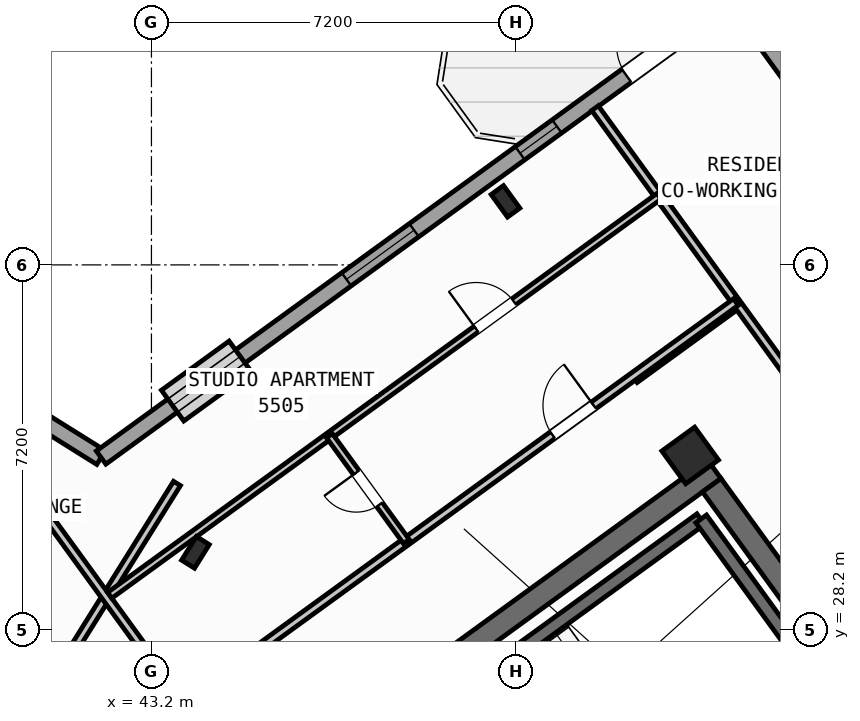
"""IFC4 building model, lengths in metres.
Left out: names, types, materials, properties, quantities, classifications, styles, units other than length and angle.
Written with IfcOpenShell. Run it as: python <this file> out.ifc"""

import sys

from ifc_helpers import new_model, si_unit, direction, frame, frame_2d, origin, origin_2d, place, context, subcontext, project, spatial, rectangle, hollow_rectangle, i_section, extrude, source, transform, mapped, element, fill, save


model = new_model("IFC4")
c1 = context("Model", 3, precision=1e-05, world=origin(), true_north=direction((0.0, 1.0)))
c2 = subcontext(c1, "Body", "Model", "MODEL_VIEW")
j1 = project(units=[si_unit("LENGTHUNIT", "METRE"), si_unit("PLANEANGLEUNIT", "RADIAN")], contexts=[c1])
p1 = place(None, origin())
s1 = spatial("IfcSite", under=j1, at=p1, CompositionType="ELEMENT")
p2 = place(p1, origin())
s2 = spatial("IfcBuilding", under=s1, at=p2, CompositionType="ELEMENT")
p3 = place(p2, frame((0.0, 0.0, 218.4)))
s3 = spatial("IfcBuildingStorey", under=s2, at=p3, CompositionType="ELEMENT", Elevation=218.4)
p4 = place(p3, frame((44.406, 24.172, 0.0), z_axis=(0.0, 0.0, 1.0), x_axis=(0.809012867805, 0.587790931986, 0.0)))
e1 = element("IfcWall", 1, at=p4, inside=s3, PredefinedType="SHEAR", context=c2, shape_type="SweptSolid", body=[
    extrude(rectangle(XDim=12.24, YDim=0.45, at=frame_2d((6.12, 0.0))), origin(), (0.0, 0.0, 1.0), 3.35),
])
p5 = place(p3, frame((58.064, 25.813, 0.0), z_axis=(0.0, 0.0, 1.0), x_axis=(-0.587774812919, 0.809024578921, 0.0)))
e2 = element("IfcWall", 2, at=p5, inside=s3, PredefinedType="SHEAR", context=c2, shape_type="SweptSolid", body=[
    extrude(rectangle(XDim=6.475, YDim=0.45, at=frame_2d((3.238, 0.0))), origin(), (0.0, 0.0, 1.0), 3.35),
])
m1 = source(origin(), c2, "Body", "SweptSolid", [
    extrude(i_section(OverallWidth=0.3, OverallDepth=0.55, WebThickness=0.015, FlangeThickness=0.029, at=origin_2d()), origin(), (0.0, 0.0, 1.0), 3.6),
])
p6 = place(p3, frame((44.068, 29.726, 0.0), z_axis=(0.0, 0.0, 1.0), x_axis=(-0.848048096156, 0.529919264233, 0.0)))
e3 = element("IfcColumn", 3, at=p6, inside=s3, PredefinedType="COLUMN", context=c2, shape_type="MappedRepresentation", body=[
    mapped(m1, transform((0.0, 0.0, 0.0), scale=1.0)),
])
m2 = source(origin(), c2, "Body", "SweptSolid", [
    extrude(hollow_rectangle(XDim=0.8, YDim=0.8, WallThickness=0.032, at=origin_2d()), origin(), (0.0, 0.0, 1.0), 3.6),
])
p7 = place(p3, frame((53.832, 31.638, 0.0), z_axis=(0.0, 0.0, 1.0), x_axis=(0.809016994375, 0.587785252292, 0.0)))
e4 = element("IfcColumn", 4, at=p7, inside=s3, PredefinedType="COLUMN", context=c2, shape_type="MappedRepresentation", body=[
    mapped(m2, transform((0.0, 0.0, 0.0), scale=1.0)),
])
p8 = place(p3, frame((50.188, 36.654, 0.0), z_axis=(0.0, 0.0, 1.0), x_axis=(0.809016994375, 0.587785252292, 0.0)))
e5 = element("IfcColumn", 5, at=p8, inside=s3, PredefinedType="COLUMN", context=c2, shape_type="MappedRepresentation", body=[
    mapped(m1, transform((0.0, 0.0, 0.0), scale=1.0)),
])
p9 = place(p3, frame((17.424, 47.083, 0.0), z_axis=(0.0, 0.0, 1.0), x_axis=(0.848049927979, -0.529916332693, 0.0)))
e6 = element("IfcWall", 6, at=p9, inside=s3, PredefinedType="STANDARD", context=c2, shape_type="SweptSolid", body=[
    extrude(rectangle(XDim=29.223, YDim=0.32, at=frame_2d((14.612, 0.0))), origin(), (0.0, 0.0, 1.0), 3.35),
])
p10 = place(p9, frame((3.77, 0.0, 0.0)))
e7 = element("IfcOpeningElement", 7, at=p10, cuts=e6, PredefinedType="OPENING", context=c2, shape_type="SweptSolid", body=[
    extrude(rectangle(XDim=1.05, YDim=2.15, at=frame_2d((0.525, 1.075))), frame((0.0, 0.17, 0.0), z_axis=(0.0, -1.0, 0.0), x_axis=(1.0, 0.0, 0.0)), (0.0, 0.0, 1.0), 0.34),
])
p11 = place(p9, frame((1.125, 0.0, 0.9)))
e8 = element("IfcOpeningElement", 8, at=p11, cuts=e6, PredefinedType="OPENING", context=c2, shape_type="SweptSolid", body=[
    extrude(rectangle(XDim=1.65, YDim=1.45, at=frame_2d((0.825, 0.725))), frame((0.0, 0.17, 0.0), z_axis=(0.0, -1.0, 0.0), x_axis=(1.0, 0.0, 0.0)), (0.0, 0.0, 1.0), 0.34),
])
p12 = place(p9, frame((7.384, 0.0, 0.9)))
e9 = element("IfcOpeningElement", 9, at=p12, cuts=e6, PredefinedType="OPENING", context=c2, shape_type="SweptSolid", body=[
    extrude(rectangle(XDim=1.35, YDim=1.45, at=frame_2d((0.675, 0.725))), frame((0.0, 0.17, 0.0), z_axis=(0.0, -1.0, 0.0), x_axis=(1.0, 0.0, 0.0)), (0.0, 0.0, 1.0), 0.34),
])
p13 = place(p9, frame((10.054, 0.0, 0.9)))
e10 = element("IfcOpeningElement", 10, at=p13, cuts=e6, PredefinedType="OPENING", context=c2, shape_type="SweptSolid", body=[
    extrude(rectangle(XDim=1.35, YDim=1.45, at=frame_2d((0.675, 0.725))), frame((0.0, 0.17, 0.0), z_axis=(0.0, -1.0, 0.0), x_axis=(1.0, 0.0, 0.0)), (0.0, 0.0, 1.0), 0.34),
])
p14 = place(p9, frame((14.039, 0.0, 1.0)))
e11 = element("IfcOpeningElement", 11, at=p14, cuts=e6, PredefinedType="OPENING", context=c2, shape_type="SweptSolid", body=[
    extrude(rectangle(XDim=0.9, YDim=1.25, at=frame_2d((0.45, 0.625))), frame((0.0, 0.17, 0.0), z_axis=(0.0, -1.0, 0.0), x_axis=(1.0, 0.0, 0.0)), (0.0, 0.0, 1.0), 0.34),
])
p15 = place(p9, frame((17.254, 0.0, 1.0)))
e12 = element("IfcOpeningElement", 12, at=p15, cuts=e6, PredefinedType="OPENING", context=c2, shape_type="SweptSolid", body=[
    extrude(rectangle(XDim=0.9, YDim=1.25, at=frame_2d((0.45, 0.625))), frame((0.0, 0.17, 0.0), z_axis=(0.0, -1.0, 0.0), x_axis=(1.0, 0.0, 0.0)), (0.0, 0.0, 1.0), 0.34),
])
p16 = place(p9, frame((20.161, 0.0, 0.9)))
e13 = element("IfcOpeningElement", 13, at=p16, cuts=e6, PredefinedType="OPENING", context=c2, shape_type="SweptSolid", body=[
    extrude(rectangle(XDim=1.35, YDim=1.45, at=frame_2d((0.675, 0.725))), frame((0.0, 0.17, 0.0), z_axis=(0.0, -1.0, 0.0), x_axis=(1.0, 0.0, 0.0)), (0.0, 0.0, 1.0), 0.34),
])
p17 = place(p9, frame((22.846, 0.0, 0.9)))
e14 = element("IfcOpeningElement", 14, at=p17, cuts=e6, PredefinedType="OPENING", context=c2, shape_type="SweptSolid", body=[
    extrude(rectangle(XDim=1.35, YDim=1.45, at=frame_2d((0.675, 0.725))), frame((0.0, 0.17, 0.0), z_axis=(0.0, -1.0, 0.0), x_axis=(1.0, 0.0, 0.0)), (0.0, 0.0, 1.0), 0.34),
])
p18 = place(p9, frame((26.898, 0.0, 1.0)))
e15 = element("IfcOpeningElement", 15, at=p18, cuts=e6, PredefinedType="OPENING", context=c2, shape_type="SweptSolid", body=[
    extrude(rectangle(XDim=0.9, YDim=1.25, at=frame_2d((0.45, 0.625))), frame((0.0, 0.17, 0.0), z_axis=(0.0, -1.0, 0.0), x_axis=(1.0, 0.0, 0.0)), (0.0, 0.0, 1.0), 0.34),
])
p19 = place(p3, frame((42.207, 31.597, 0.0), z_axis=(0.0, 0.0, 1.0), x_axis=(0.809020333377, 0.587780656523, 0.0)))
e16 = element("IfcWall", 16, at=p19, inside=s3, PredefinedType="STANDARD", context=c2, shape_type="SweptSolid", body=[
    extrude(rectangle(XDim=15.223, YDim=0.32, at=frame_2d((7.611, 0.0))), origin(), (0.0, 0.0, 1.0), 3.35),
])
p20 = place(p19, frame((12.82, 0.0, 0.0)))
e17 = element("IfcOpeningElement", 17, at=p20, cuts=e16, PredefinedType="OPENING", context=c2, shape_type="SweptSolid", body=[
    extrude(rectangle(XDim=1.05, YDim=2.15, at=frame_2d((0.525, 1.075))), frame((0.0, 0.17, 0.0), z_axis=(0.0, -1.0, 0.0), x_axis=(1.0, 0.0, 0.0)), (0.0, 0.0, 1.0), 0.34),
])
p21 = place(p19, frame((1.745, 0.0, 0.9)))
e18 = element("IfcOpeningElement", 18, at=p21, cuts=e16, PredefinedType="OPENING", context=c2, shape_type="SweptSolid", body=[
    extrude(rectangle(XDim=1.65, YDim=1.45, at=frame_2d((0.825, 0.725))), frame((0.0, 0.17, 0.0), z_axis=(0.0, -1.0, 0.0), x_axis=(1.0, 0.0, 0.0)), (0.0, 0.0, 1.0), 0.34),
])
p22 = place(p19, frame((5.985, 0.0, 0.9)))
e19 = element("IfcOpeningElement", 19, at=p22, cuts=e16, PredefinedType="OPENING", context=c2, shape_type="SweptSolid", body=[
    extrude(rectangle(XDim=1.65, YDim=1.45, at=frame_2d((0.825, 0.725))), frame((0.0, 0.17, 0.0), z_axis=(0.0, -1.0, 0.0), x_axis=(1.0, 0.0, 0.0)), (0.0, 0.0, 1.0), 0.34),
])
p23 = place(p19, frame((10.219, 0.0, 1.0)))
e20 = element("IfcOpeningElement", 20, at=p23, cuts=e16, PredefinedType="OPENING", context=c2, shape_type="SweptSolid", body=[
    extrude(rectangle(XDim=0.9, YDim=1.25, at=frame_2d((0.45, 0.625))), frame((0.0, 0.17, 0.0), z_axis=(0.0, -1.0, 0.0), x_axis=(1.0, 0.0, 0.0)), (0.0, 0.0, 1.0), 0.34),
])
p24 = place(p3, frame((54.81, 40.5, 0.0), z_axis=(0.0, 0.0, 1.0), x_axis=(0.587783625747, -0.809018176127, 0.0)))
e21 = element("IfcWall", 21, at=p24, inside=s3, PredefinedType="STANDARD", context=c2, shape_type="SweptSolid", body=[
    extrude(rectangle(XDim=21.587, YDim=0.32, at=frame_2d((10.794, 0.0))), origin(), (0.0, 0.0, 1.0), 2.825),
])
p25 = place(p24, frame((2.606, 0.0, 0.9)))
e22 = element("IfcOpeningElement", 22, at=p25, cuts=e21, PredefinedType="OPENING", context=c2, shape_type="SweptSolid", body=[
    extrude(rectangle(XDim=1.65, YDim=1.45, at=frame_2d((0.825, 0.725))), frame((0.0, 0.17, 0.0), z_axis=(0.0, -1.0, 0.0), x_axis=(1.0, 0.0, 0.0)), (0.0, 0.0, 1.0), 0.34),
])
p26 = place(p24, frame((11.184, 0.0, 0.9)))
e23 = element("IfcOpeningElement", 23, at=p26, cuts=e21, PredefinedType="OPENING", context=c2, shape_type="SweptSolid", body=[
    extrude(rectangle(XDim=1.35, YDim=1.45, at=frame_2d((0.675, 0.725))), frame((0.0, 0.17, 0.0), z_axis=(0.0, -1.0, 0.0), x_axis=(1.0, 0.0, 0.0)), (0.0, 0.0, 1.0), 0.34),
])
p27 = place(p24, frame((15.202, 0.0, 1.0)))
e24 = element("IfcOpeningElement", 24, at=p27, cuts=e21, PredefinedType="OPENING", context=c2, shape_type="SweptSolid", body=[
    extrude(rectangle(XDim=0.9, YDim=1.25, at=frame_2d((0.45, 0.625))), frame((0.0, 0.17, 0.0), z_axis=(0.0, -1.0, 0.0), x_axis=(1.0, 0.0, 0.0)), (0.0, 0.0, 1.0), 0.34),
])
p28 = place(p24, frame((18.607, 0.0, 1.0)))
e25 = element("IfcOpeningElement", 25, at=p28, cuts=e21, PredefinedType="OPENING", context=c2, shape_type="SweptSolid", body=[
    extrude(rectangle(XDim=0.9, YDim=1.25, at=frame_2d((0.45, 0.625))), frame((0.0, 0.17, 0.0), z_axis=(0.0, -1.0, 0.0), x_axis=(1.0, 0.0, 0.0)), (0.0, 0.0, 1.0), 0.34),
])
p29 = place(p3, frame((48.006, 25.996, 0.0), z_axis=(0.0, 0.0, 1.0), x_axis=(0.80901903764, 0.587782439969, 0.0)))
e26 = element("IfcWall", 26, at=p29, inside=s3, PredefinedType="SHEAR", context=c2, shape_type="SweptSolid", body=[
    extrude(rectangle(XDim=7.46, YDim=0.26, at=frame_2d((3.73, 0.0))), origin(), (0.0, 0.0, 1.0), 3.35),
])
p30 = place(p3, frame((55.906, 27.831, 0.0), z_axis=(0.0, 0.0, 1.0), x_axis=(-0.587804123638, 0.809003283204, 0.0)))
e27 = element("IfcWall", 27, at=p30, inside=s3, PredefinedType="SHEAR", context=c2, shape_type="SweptSolid", body=[
    extrude(rectangle(XDim=3.16, YDim=0.26, at=frame_2d((1.58, 0.0))), origin(), (0.0, 0.0, 1.0), 3.35),
])
p31 = place(p3, frame((41.936, 26.012, 0.0), z_axis=(0.0, 0.0, 1.0), x_axis=(-0.848051154596, 0.529914369676, 0.0)))
e28 = element("IfcWall", 28, at=p31, inside=s3, PredefinedType="PARTITIONING", context=c2, shape_type="SweptSolid", body=[
    extrude(rectangle(XDim=15.57, YDim=0.16, at=frame_2d((7.785, 0.0))), origin(), (0.0, 0.0, 1.0), 3.34),
])
p32 = place(p31, frame((3.415, 0.0, 0.0)))
e29 = element("IfcOpeningElement", 29, at=p32, cuts=e28, PredefinedType="OPENING", context=c2, shape_type="SweptSolid", body=[
    extrude(rectangle(XDim=1.0, YDim=2.1, at=frame_2d((0.5, 1.05))), frame((0.0, 0.09, 0.0), z_axis=(0.0, -1.0, 0.0), x_axis=(1.0, 0.0, 0.0)), (0.0, 0.0, 1.0), 0.18),
])
p33 = place(p31, frame((10.565, 0.0, 0.0)))
e30 = element("IfcOpeningElement", 30, at=p33, cuts=e28, PredefinedType="OPENING", context=c2, shape_type="SweptSolid", body=[
    extrude(rectangle(XDim=1.0, YDim=2.1, at=frame_2d((0.5, 1.05))), frame((0.0, 0.09, 0.0), z_axis=(0.0, -1.0, 0.0), x_axis=(1.0, 0.0, 0.0)), (0.0, 0.0, 1.0), 0.18),
])
p34 = place(p3, frame((43.704, 31.086, 0.0), z_axis=(0.0, 0.0, 1.0), x_axis=(-0.529906828443, -0.848055866774, 0.0)))
e31 = element("IfcWall", 31, at=p34, inside=s3, PredefinedType="PARTITIONING", context=c2, shape_type="SweptSolid", body=[
    extrude(rectangle(XDim=5.48, YDim=0.16, at=frame_2d((2.74, 0.0))), origin(), (0.0, 0.0, 1.0), 3.34),
])
p35 = place(p3, frame((52.739, 33.143, 0.0), z_axis=(0.0, 0.0, 1.0), x_axis=(0.809000999347, 0.58780726693, 0.0)))
e32 = element("IfcWall", 32, at=p35, inside=s3, PredefinedType="PARTITIONING", context=c2, shape_type="SweptSolid", body=[
    extrude(rectangle(XDim=2.51, YDim=0.16, at=frame_2d((1.255, 0.0))), origin(), (0.0, 0.0, 1.0), 3.34),
])
p36 = place(p3, frame((56.627, 32.062, 0.0), z_axis=(0.0, 0.0, 1.0), x_axis=(-0.587769918433, 0.809028134854, 0.0)))
e33 = element("IfcWall", 33, at=p36, inside=s3, PredefinedType="PARTITIONING", context=c2, shape_type="SweptSolid", body=[
    extrude(rectangle(XDim=7.95, YDim=0.16, at=frame_2d((3.975, 0.0))), origin(), (0.0, 0.0, 1.0), 3.34),
])
p37 = place(p3, frame((42.866, 26.044, 0.0), z_axis=(0.0, 0.0, 1.0), x_axis=(0.809020254154, 0.587780765566, 0.0)))
e34 = element("IfcWall", 34, at=p37, inside=s3, PredefinedType="PARTITIONING", context=c2, shape_type="SweptSolid", body=[
    extrude(rectangle(XDim=14.67, YDim=0.16, at=frame_2d((7.335, 0.0))), origin(), (0.0, 0.0, 1.0), 3.34),
])
p38 = place(p37, frame((10.2, 0.0, 0.0)))
e35 = element("IfcOpeningElement", 35, at=p38, cuts=e34, PredefinedType="OPENING", context=c2, shape_type="SweptSolid", body=[
    extrude(rectangle(XDim=1.0, YDim=2.1, at=frame_2d((0.5, 1.05))), frame((0.0, 0.09, 0.0), z_axis=(0.0, -1.0, 0.0), x_axis=(1.0, 0.0, 0.0)), (0.0, 0.0, 1.0), 0.18),
])
p39 = place(p3, frame((43.969, 26.55, 0.0), z_axis=(0.0, 0.0, 1.0), x_axis=(-0.587776919386, 0.80902304852, 0.0)))
e36 = element("IfcWall", 36, at=p39, inside=s3, PredefinedType="PARTITIONING", context=c2, shape_type="SweptSolid", body=[
    extrude(rectangle(XDim=5.48, YDim=0.16, at=frame_2d((2.74, 0.0))), origin(), (0.0, 0.0, 1.0), 3.34),
])
p40 = place(p3, frame((42.377, 28.878, 0.0), z_axis=(0.0, 0.0, 1.0), x_axis=(0.809020411523, 0.587780548963, 0.0)))
e37 = element("IfcWall", 37, at=p40, inside=s3, PredefinedType="PLUMBINGWALL", context=c2, shape_type="SweptSolid", body=[
    extrude(rectangle(XDim=13.4, YDim=0.14, at=frame_2d((6.7, 0.0))), origin(), (0.0, 0.0, 1.0), 3.34),
])
p41 = place(p40, frame((8.94, 0.0, 0.0)))
e38 = element("IfcOpeningElement", 38, at=p41, cuts=e37, PredefinedType="OPENING", context=c2, shape_type="SweptSolid", body=[
    extrude(rectangle(XDim=0.92, YDim=2.08, at=frame_2d((0.46, 1.04))), frame((0.0, 0.08, 0.0), z_axis=(0.0, -1.0, 0.0), x_axis=(1.0, 0.0, 0.0)), (0.0, 0.0, 1.0), 0.16),
])
p42 = place(p3, frame((48.229, 29.941, 0.0), z_axis=(0.0, 0.0, 1.0), x_axis=(-0.587772116736, 0.809026537752, 0.0)))
e39 = element("IfcWall", 39, at=p42, inside=s3, PredefinedType="PLUMBINGWALL", context=c2, shape_type="SweptSolid", body=[
    extrude(rectangle(XDim=2.58, YDim=0.14, at=frame_2d((1.29, 0.0))), origin(), (0.0, 0.0, 1.0), 3.34),
])
p43 = place(p42, frame((0.9, 0.0, 0.0)))
e40 = element("IfcOpeningElement", 40, at=p43, cuts=e39, PredefinedType="OPENING", context=c2, shape_type="SweptSolid", body=[
    extrude(rectangle(XDim=0.78, YDim=2.05, at=frame_2d((0.39, 1.025))), frame((0.0, 0.08, 0.0), z_axis=(0.0, -1.0, 0.0), x_axis=(1.0, 0.0, 0.0)), (0.0, 0.0, 1.0), 0.16),
])
m3 = source(origin(), c2, "Body", "SweptSolid", [
    extrude(rectangle(XDim=1.05, YDim=2.15, at=frame_2d((0.525, 1.075))), frame((0.0, 0.025, 0.0), z_axis=(0.0, -1.0, 0.0), x_axis=(1.0, 0.0, 0.0)), (0.0, 0.0, 1.0), 0.05),
])
p44 = place(p20, origin())
e41 = element("IfcDoor", 41, at=p44, inside=s3, OperationType="SINGLE_SWING_RIGHT", PredefinedType="DOOR", context=c2, shape_type="MappedRepresentation", body=[
    mapped(m3, transform((0.0, 0.0, 0.0), scale=1.0)),
])
fill(e17, e41)
m4 = source(origin(), c2, "Body", "SweptSolid", [
    extrude(rectangle(XDim=1.65, YDim=1.45, at=frame_2d((0.825, 0.725))), frame((0.0, 0.03, 0.0), z_axis=(0.0, -1.0, 0.0), x_axis=(1.0, 0.0, 0.0)), (0.0, 0.0, 1.0), 0.06),
])
p45 = place(p21, origin())
e42 = element("IfcWindow", 42, at=p45, inside=s3, PartitioningType="SINGLE_PANEL", PredefinedType="WINDOW", context=c2, shape_type="MappedRepresentation", body=[
    mapped(m4, transform((0.0, 0.0, 0.0), scale=1.0)),
])
fill(e18, e42)
p46 = place(p22, origin())
e43 = element("IfcWindow", 43, at=p46, inside=s3, PartitioningType="SINGLE_PANEL", PredefinedType="WINDOW", context=c2, shape_type="MappedRepresentation", body=[
    mapped(m4, transform((0.0, 0.0, 0.0), scale=1.0)),
])
fill(e19, e43)
m5 = source(origin(), c2, "Body", "SweptSolid", [
    extrude(rectangle(XDim=0.9, YDim=1.25, at=frame_2d((0.45, 0.625))), frame((0.0, 0.03, 0.0), z_axis=(0.0, -1.0, 0.0), x_axis=(1.0, 0.0, 0.0)), (0.0, 0.0, 1.0), 0.06),
])
p47 = place(p23, origin())
e44 = element("IfcWindow", 44, at=p47, inside=s3, PartitioningType="SINGLE_PANEL", PredefinedType="WINDOW", context=c2, shape_type="MappedRepresentation", body=[
    mapped(m5, transform((0.0, 0.0, 0.0), scale=1.0)),
])
fill(e20, e44)
m6 = source(origin(), c2, "Body", "SweptSolid", [
    extrude(rectangle(XDim=1.0, YDim=2.1, at=frame_2d((0.5, 1.05))), frame((0.0, 0.025, 0.0), z_axis=(0.0, -1.0, 0.0), x_axis=(1.0, 0.0, 0.0)), (0.0, 0.0, 1.0), 0.05),
])
p48 = place(p38, origin())
e45 = element("IfcDoor", 45, at=p48, inside=s3, OperationType="SINGLE_SWING_RIGHT", PredefinedType="DOOR", context=c2, shape_type="MappedRepresentation", body=[
    mapped(m6, transform((0.0, 0.0, 0.0), scale=1.0)),
])
fill(e35, e45)
m7 = source(origin(), c2, "Body", "SweptSolid", [
    extrude(rectangle(XDim=0.92, YDim=2.08, at=frame_2d((0.46, 1.04))), frame((0.0, 0.025, 0.0), z_axis=(0.0, -1.0, 0.0), x_axis=(1.0, 0.0, 0.0)), (0.0, 0.0, 1.0), 0.05),
])
p49 = place(p41, origin())
e46 = element("IfcDoor", 46, at=p49, inside=s3, OperationType="SINGLE_SWING_LEFT", PredefinedType="DOOR", context=c2, shape_type="MappedRepresentation", body=[
    mapped(m7, transform((0.0, 0.0, 0.0), scale=1.0)),
])
fill(e38, e46)
m8 = source(origin(), c2, "Body", "SweptSolid", [
    extrude(rectangle(XDim=0.78, YDim=2.05, at=frame_2d((0.39, 1.025))), frame((0.0, 0.025, 0.0), z_axis=(0.0, -1.0, 0.0), x_axis=(1.0, 0.0, 0.0)), (0.0, 0.0, 1.0), 0.05),
])
p50 = place(p43, origin())
e47 = element("IfcDoor", 47, at=p50, inside=s3, OperationType="SINGLE_SWING_RIGHT", PredefinedType="DOOR", context=c2, shape_type="MappedRepresentation", body=[
    mapped(m8, transform((0.0, 0.0, 0.0), scale=1.0)),
])
fill(e40, e47)
save(model, sys.argv[1])
